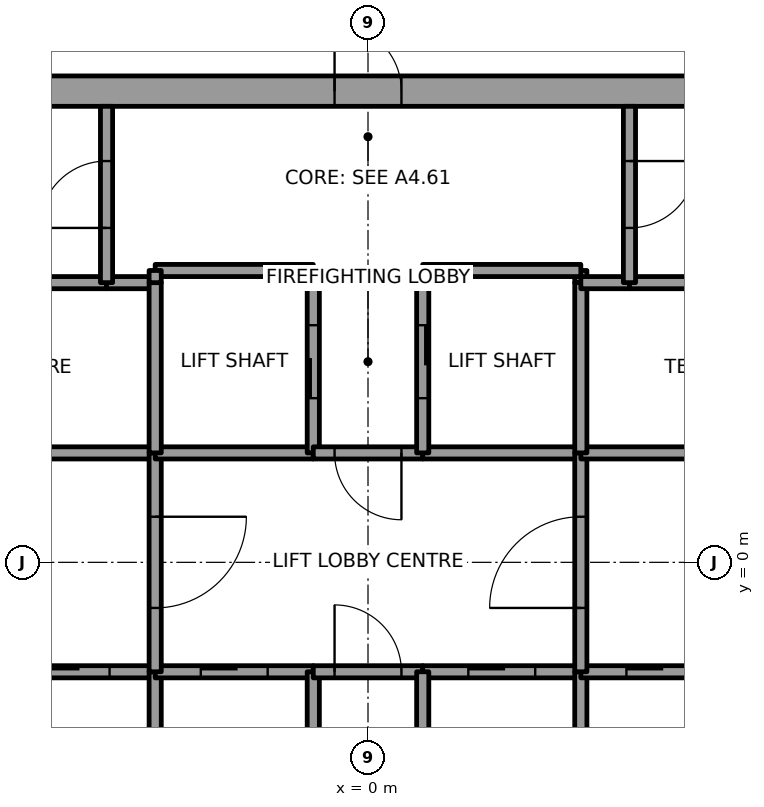
"""IFC4 building model, lengths in metres.
Left out: names, types, materials, properties, quantities, classifications, styles, units other than length and angle.
Written with IfcOpenShell. Run it as: python <this file> out.ifc"""

import sys

from ifc_helpers import new_model, si_unit, direction, frame, frame_2d, origin, place, context, subcontext, project, spatial, rectangle, extrude, element, fill, save


model = new_model("IFC4")
c1 = context("Model", 3, precision=1e-05, world=origin(), true_north=direction((0.0, 1.0)))
c2 = subcontext(c1, "Body", "Model", "MODEL_VIEW")
j1 = project(units=[si_unit("LENGTHUNIT", "METRE"), si_unit("PLANEANGLEUNIT", "RADIAN")], contexts=[c1])
p1 = place(None, origin())
s1 = spatial("IfcSite", under=j1, at=p1, CompositionType="ELEMENT")
p2 = place(p1, origin())
s2 = spatial("IfcBuilding", under=s1, at=p2, CompositionType="ELEMENT")
p3 = place(p2, frame((0.0, 0.0, 263.0)))
s3 = spatial("IfcBuildingStorey", under=s2, at=p3, CompositionType="ELEMENT", Elevation=263.0)
p4 = place(p3, frame((-11.0, 7.75, 0.0), z_axis=(0.0, 0.0, 1.0), x_axis=(1.0, 0.0, 0.0)))
e1 = element("IfcWall", 1, at=p4, inside=s3, PredefinedType="SHEAR", context=c2, shape_type="SweptSolid", body=[
    extrude(rectangle(XDim=22.0, YDim=0.5, at=frame_2d((11.0, 0.0))), origin(), (0.0, 0.0, 1.0), 4.0),
])
p5 = place(p4, frame((10.45, 0.0, 0.0)))
e2 = element("IfcOpeningElement", 2, at=p5, cuts=e1, PredefinedType="OPENING", context=c2, shape_type="SweptSolid", body=[
    extrude(rectangle(XDim=1.1, YDim=2.1, at=frame_2d((0.55, 1.05))), frame((0.0, 0.25, 0.0), z_axis=(0.0, -1.0, 0.0), x_axis=(1.0, 0.0, 0.0)), (0.0, 0.0, 1.0), 0.5),
])
p6 = place(p3, frame((-8.7, 1.8, 0.0), z_axis=(0.0, 0.0, 1.0), x_axis=(1.0, 0.0, 0.0)))
e3 = element("IfcWall", 3, at=p6, inside=s3, PredefinedType="SOLIDWALL", context=c2, shape_type="SweptSolid", body=[
    extrude(rectangle(XDim=5.2, YDim=0.2, at=frame_2d((2.6, 0.0))), origin(), (0.0, 0.0, 1.0), 3.85),
])
p7 = place(p6, frame((2.15, 0.0, 0.0)))
e4 = element("IfcOpeningElement", 4, at=p7, cuts=e3, PredefinedType="OPENING", context=c2, shape_type="SweptSolid", body=[
    extrude(rectangle(XDim=0.9, YDim=2.1, at=frame_2d((0.45, 1.05))), frame((0.0, 0.1, 0.0), z_axis=(0.0, -1.0, 0.0), x_axis=(1.0, 0.0, 0.0)), (0.0, 0.0, 1.0), 0.2),
])
p8 = place(p3, frame((-4.3, 4.6, 0.0), z_axis=(0.0, 0.0, 1.0), x_axis=(-1.0, 0.0, 0.0)))
e5 = element("IfcWall", 5, at=p8, inside=s3, PredefinedType="SOLIDWALL", context=c2, shape_type="SweptSolid", body=[
    extrude(rectangle(XDim=4.4, YDim=0.2, at=frame_2d((2.2, 0.0))), origin(), (0.0, 0.0, 1.0), 3.85),
])
p9 = place(p3, frame((-6.1, -1.8, 0.0), z_axis=(0.0, 0.0, 1.0), x_axis=(1.0, 0.0, 0.0)))
e6 = element("IfcWall", 6, at=p9, inside=s3, PredefinedType="SOLIDWALL", context=c2, shape_type="SweptSolid", body=[
    extrude(rectangle(XDim=2.6, YDim=0.2, at=frame_2d((1.3, 0.0))), origin(), (0.0, 0.0, 1.0), 3.85),
])
p10 = place(p9, frame((0.75, 0.0, 0.0)))
e7 = element("IfcOpeningElement", 7, at=p10, cuts=e6, PredefinedType="OPENING", context=c2, shape_type="SweptSolid", body=[
    extrude(rectangle(XDim=1.1, YDim=2.1, at=frame_2d((0.55, 1.05))), frame((0.0, 0.1, 0.0), z_axis=(0.0, -1.0, 0.0), x_axis=(1.0, 0.0, 0.0)), (0.0, 0.0, 1.0), 0.2),
])
p11 = place(p3, frame((-3.5, 4.6, 0.0), z_axis=(0.0, 0.0, 1.0), x_axis=(-1.0, 0.0, 0.0)))
e8 = element("IfcWall", 8, at=p11, inside=s3, PredefinedType="SOLIDWALL", context=c2, shape_type="SweptSolid", body=[
    extrude(rectangle(XDim=0.8, YDim=0.2, at=frame_2d((0.4, 0.0))), origin(), (0.0, 0.0, 1.0), 3.85),
])
p12 = place(p3, frame((-4.3, 4.6, 0.0), z_axis=(0.0, 0.0, 1.0), x_axis=(0.0, 1.0, 0.0)))
e9 = element("IfcWall", 9, at=p12, inside=s3, PredefinedType="SOLIDWALL", context=c2, shape_type="SweptSolid", body=[
    extrude(rectangle(XDim=2.9, YDim=0.2, at=frame_2d((1.45, 0.0))), origin(), (0.0, 0.0, 1.0), 3.85),
])
p13 = place(p12, frame((0.9, 0.0, 0.0)))
e10 = element("IfcOpeningElement", 10, at=p13, cuts=e9, PredefinedType="OPENING", context=c2, shape_type="SweptSolid", body=[
    extrude(rectangle(XDim=1.1, YDim=2.1, at=frame_2d((0.55, 1.05))), frame((0.0, 0.1, 0.0), z_axis=(0.0, -1.0, 0.0), x_axis=(1.0, 0.0, 0.0)), (0.0, 0.0, 1.0), 0.2),
])
p14 = place(p3, frame((-3.5, -4.6, 0.0), z_axis=(0.0, 0.0, 1.0), x_axis=(0.0, 1.0, 0.0)))
e11 = element("IfcWall", 11, at=p14, inside=s3, PredefinedType="SOLIDWALL", context=c2, shape_type="SweptSolid", body=[
    extrude(rectangle(XDim=2.8, YDim=0.2, at=frame_2d((1.4, 0.0))), origin(), (0.0, 0.0, 1.0), 3.85),
])
p15 = place(p3, frame((-3.5, -1.8, 0.0), z_axis=(0.0, 0.0, 1.0), x_axis=(1.0, 0.0, 0.0)))
e12 = element("IfcWall", 12, at=p15, inside=s3, PredefinedType="SOLIDWALL", context=c2, shape_type="SweptSolid", body=[
    extrude(rectangle(XDim=2.6, YDim=0.2, at=frame_2d((1.3, 0.0))), origin(), (0.0, 0.0, 1.0), 3.85),
])
p16 = place(p15, frame((0.75, 0.0, 0.0)))
e13 = element("IfcOpeningElement", 13, at=p16, cuts=e12, PredefinedType="OPENING", context=c2, shape_type="SweptSolid", body=[
    extrude(rectangle(XDim=1.1, YDim=2.1, at=frame_2d((0.55, 1.05))), frame((0.0, 0.1, 0.0), z_axis=(0.0, -1.0, 0.0), x_axis=(1.0, 0.0, 0.0)), (0.0, 0.0, 1.0), 0.2),
])
p17 = place(p3, frame((-3.5, 1.8, 0.0), z_axis=(0.0, 0.0, 1.0), x_axis=(0.0, -1.0, 0.0)))
e14 = element("IfcWall", 14, at=p17, inside=s3, PredefinedType="SOLIDWALL", context=c2, shape_type="SweptSolid", body=[
    extrude(rectangle(XDim=3.6, YDim=0.2, at=frame_2d((1.8, 0.0))), origin(), (0.0, 0.0, 1.0), 3.85),
])
p18 = place(p17, frame((1.05, 0.0, 0.0)))
e15 = element("IfcOpeningElement", 15, at=p18, cuts=e14, PredefinedType="OPENING", context=c2, shape_type="SweptSolid", body=[
    extrude(rectangle(XDim=1.5, YDim=2.1, at=frame_2d((0.75, 1.05))), frame((0.0, 0.1, 0.0), z_axis=(0.0, -1.0, 0.0), x_axis=(1.0, 0.0, 0.0)), (0.0, 0.0, 1.0), 0.2),
])
p19 = place(p3, frame((-0.9, 1.8, 0.0), z_axis=(0.0, 0.0, 1.0), x_axis=(-1.0, 0.0, 0.0)))
e16 = element("IfcWall", 16, at=p19, inside=s3, PredefinedType="SOLIDWALL", context=c2, shape_type="SweptSolid", body=[
    extrude(rectangle(XDim=2.6, YDim=0.2, at=frame_2d((1.3, 0.0))), origin(), (0.0, 0.0, 1.0), 3.85),
])
p20 = place(p3, frame((-3.5, 1.8, 0.0), z_axis=(0.0, 0.0, 1.0), x_axis=(0.0, 1.0, 0.0)))
e17 = element("IfcWall", 17, at=p20, inside=s3, PredefinedType="SOLIDWALL", context=c2, shape_type="SweptSolid", body=[
    extrude(rectangle(XDim=2.8, YDim=0.2, at=frame_2d((1.4, 0.0))), origin(), (0.0, 0.0, 1.0), 3.85),
])
p21 = place(p3, frame((-0.9, 1.8, 0.0), z_axis=(0.0, 0.0, 1.0), x_axis=(0.0, 1.0, 0.0)))
e18 = element("IfcWall", 18, at=p21, inside=s3, PredefinedType="SOLIDWALL", context=c2, shape_type="SweptSolid", body=[
    extrude(rectangle(XDim=3.0, YDim=0.2, at=frame_2d((1.5, 0.0))), origin(), (0.0, 0.0, 1.0), 3.85),
])
p22 = place(p21, frame((0.9, 0.0, 0.0)))
e19 = element("IfcOpeningElement", 19, at=p22, cuts=e18, PredefinedType="OPENING", context=c2, shape_type="SweptSolid", body=[
    extrude(rectangle(XDim=1.2, YDim=2.1, at=frame_2d((0.6, 1.05))), frame((0.0, 0.1, 0.0), z_axis=(0.0, -1.0, 0.0), x_axis=(1.0, 0.0, 0.0)), (0.0, 0.0, 1.0), 0.2),
])
p23 = place(p3, frame((-0.9, 4.8, 0.0), z_axis=(0.0, 0.0, 1.0), x_axis=(-1.0, 0.0, 0.0)))
e20 = element("IfcWall", 20, at=p23, inside=s3, PredefinedType="SOLIDWALL", context=c2, shape_type="SweptSolid", body=[
    extrude(rectangle(XDim=2.6, YDim=0.2, at=frame_2d((1.3, 0.0))), origin(), (0.0, 0.0, 1.0), 3.85),
])
p24 = place(p3, frame((-3.5, 4.8, 0.0), z_axis=(0.0, 0.0, 1.0), x_axis=(0.0, -1.0, 0.0)))
e21 = element("IfcWall", 21, at=p24, inside=s3, PredefinedType="SOLIDWALL", context=c2, shape_type="SweptSolid", body=[
    extrude(rectangle(XDim=0.2, YDim=0.2, at=frame_2d((0.1, 0.0))), origin(), (0.0, 0.0, 1.0), 3.85),
])
p25 = place(p3, frame((-0.9, -4.6, 0.0), z_axis=(0.0, 0.0, 1.0), x_axis=(0.0, 1.0, 0.0)))
e22 = element("IfcWall", 22, at=p25, inside=s3, PredefinedType="SOLIDWALL", context=c2, shape_type="SweptSolid", body=[
    extrude(rectangle(XDim=2.8, YDim=0.2, at=frame_2d((1.4, 0.0))), origin(), (0.0, 0.0, 1.0), 3.85),
])
p26 = place(p3, frame((-0.9, -1.8, 0.0), z_axis=(0.0, 0.0, 1.0), x_axis=(1.0, 0.0, 0.0)))
e23 = element("IfcWall", 23, at=p26, inside=s3, PredefinedType="SOLIDWALL", context=c2, shape_type="SweptSolid", body=[
    extrude(rectangle(XDim=1.8, YDim=0.2, at=frame_2d((0.9, 0.0))), origin(), (0.0, 0.0, 1.0), 3.85),
])
p27 = place(p26, frame((0.35, 0.0, 0.0)))
e24 = element("IfcOpeningElement", 24, at=p27, cuts=e23, PredefinedType="OPENING", context=c2, shape_type="SweptSolid", body=[
    extrude(rectangle(XDim=1.1, YDim=2.1, at=frame_2d((0.55, 1.05))), frame((0.0, 0.1, 0.0), z_axis=(0.0, -1.0, 0.0), x_axis=(1.0, 0.0, 0.0)), (0.0, 0.0, 1.0), 0.2),
])
p28 = place(p3, frame((0.9, 1.8, 0.0), z_axis=(0.0, 0.0, 1.0), x_axis=(-1.0, 0.0, 0.0)))
e25 = element("IfcWall", 25, at=p28, inside=s3, PredefinedType="SOLIDWALL", context=c2, shape_type="SweptSolid", body=[
    extrude(rectangle(XDim=1.8, YDim=0.2, at=frame_2d((0.9, 0.0))), origin(), (0.0, 0.0, 1.0), 3.85),
])
p29 = place(p28, frame((0.35, 0.0, 0.0)))
e26 = element("IfcOpeningElement", 26, at=p29, cuts=e25, PredefinedType="OPENING", context=c2, shape_type="SweptSolid", body=[
    extrude(rectangle(XDim=1.1, YDim=2.1, at=frame_2d((0.55, 1.05))), frame((0.0, 0.1, 0.0), z_axis=(0.0, -1.0, 0.0), x_axis=(1.0, 0.0, 0.0)), (0.0, 0.0, 1.0), 0.2),
])
p30 = place(p3, frame((0.9, -1.8, 0.0), z_axis=(0.0, 0.0, 1.0), x_axis=(1.0, 0.0, 0.0)))
e27 = element("IfcWall", 27, at=p30, inside=s3, PredefinedType="SOLIDWALL", context=c2, shape_type="SweptSolid", body=[
    extrude(rectangle(XDim=2.6, YDim=0.2, at=frame_2d((1.3, 0.0))), origin(), (0.0, 0.0, 1.0), 3.85),
])
p31 = place(p30, frame((0.75, 0.0, 0.0)))
e28 = element("IfcOpeningElement", 28, at=p31, cuts=e27, PredefinedType="OPENING", context=c2, shape_type="SweptSolid", body=[
    extrude(rectangle(XDim=1.1, YDim=2.1, at=frame_2d((0.55, 1.05))), frame((0.0, 0.1, 0.0), z_axis=(0.0, -1.0, 0.0), x_axis=(1.0, 0.0, 0.0)), (0.0, 0.0, 1.0), 0.2),
])
p32 = place(p3, frame((0.9, -1.8, 0.0), z_axis=(0.0, 0.0, 1.0), x_axis=(0.0, -1.0, 0.0)))
e29 = element("IfcWall", 29, at=p32, inside=s3, PredefinedType="SOLIDWALL", context=c2, shape_type="SweptSolid", body=[
    extrude(rectangle(XDim=2.8, YDim=0.2, at=frame_2d((1.4, 0.0))), origin(), (0.0, 0.0, 1.0), 3.85),
])
p33 = place(p3, frame((3.5, 1.8, 0.0), z_axis=(0.0, 0.0, 1.0), x_axis=(-1.0, 0.0, 0.0)))
e30 = element("IfcWall", 30, at=p33, inside=s3, PredefinedType="SOLIDWALL", context=c2, shape_type="SweptSolid", body=[
    extrude(rectangle(XDim=2.6, YDim=0.2, at=frame_2d((1.3, 0.0))), origin(), (0.0, 0.0, 1.0), 3.85),
])
p34 = place(p3, frame((3.5, 4.6, 0.0), z_axis=(0.0, 0.0, 1.0), x_axis=(0.0, 1.0, 0.0)))
e31 = element("IfcWall", 31, at=p34, inside=s3, PredefinedType="SOLIDWALL", context=c2, shape_type="SweptSolid", body=[
    extrude(rectangle(XDim=0.2, YDim=0.2, at=frame_2d((0.1, 0.0))), origin(), (0.0, 0.0, 1.0), 3.85),
])
p35 = place(p3, frame((3.5, 4.8, 0.0), z_axis=(0.0, 0.0, 1.0), x_axis=(-1.0, 0.0, 0.0)))
e32 = element("IfcWall", 32, at=p35, inside=s3, PredefinedType="SOLIDWALL", context=c2, shape_type="SweptSolid", body=[
    extrude(rectangle(XDim=2.6, YDim=0.2, at=frame_2d((1.3, 0.0))), origin(), (0.0, 0.0, 1.0), 3.85),
])
p36 = place(p3, frame((0.9, 4.8, 0.0), z_axis=(0.0, 0.0, 1.0), x_axis=(0.0, -1.0, 0.0)))
e33 = element("IfcWall", 33, at=p36, inside=s3, PredefinedType="SOLIDWALL", context=c2, shape_type="SweptSolid", body=[
    extrude(rectangle(XDim=3.0, YDim=0.2, at=frame_2d((1.5, 0.0))), origin(), (0.0, 0.0, 1.0), 3.85),
])
p37 = place(p36, frame((0.9, 0.0, 0.0)))
e34 = element("IfcOpeningElement", 34, at=p37, cuts=e33, PredefinedType="OPENING", context=c2, shape_type="SweptSolid", body=[
    extrude(rectangle(XDim=1.2, YDim=2.1, at=frame_2d((0.6, 1.05))), frame((0.0, 0.1, 0.0), z_axis=(0.0, -1.0, 0.0), x_axis=(1.0, 0.0, 0.0)), (0.0, 0.0, 1.0), 0.2),
])
p38 = place(p3, frame((3.5, -4.6, 0.0), z_axis=(0.0, 0.0, 1.0), x_axis=(0.0, 1.0, 0.0)))
e35 = element("IfcWall", 35, at=p38, inside=s3, PredefinedType="SOLIDWALL", context=c2, shape_type="SweptSolid", body=[
    extrude(rectangle(XDim=2.8, YDim=0.2, at=frame_2d((1.4, 0.0))), origin(), (0.0, 0.0, 1.0), 3.85),
])
p39 = place(p3, frame((3.5, -1.8, 0.0), z_axis=(0.0, 0.0, 1.0), x_axis=(1.0, 0.0, 0.0)))
e36 = element("IfcWall", 36, at=p39, inside=s3, PredefinedType="SOLIDWALL", context=c2, shape_type="SweptSolid", body=[
    extrude(rectangle(XDim=2.6, YDim=0.2, at=frame_2d((1.3, 0.0))), origin(), (0.0, 0.0, 1.0), 3.85),
])
p40 = place(p39, frame((0.75, 0.0, 0.0)))
e37 = element("IfcOpeningElement", 37, at=p40, cuts=e36, PredefinedType="OPENING", context=c2, shape_type="SweptSolid", body=[
    extrude(rectangle(XDim=1.1, YDim=2.1, at=frame_2d((0.55, 1.05))), frame((0.0, 0.1, 0.0), z_axis=(0.0, -1.0, 0.0), x_axis=(1.0, 0.0, 0.0)), (0.0, 0.0, 1.0), 0.2),
])
p41 = place(p3, frame((3.5, -1.8, 0.0), z_axis=(0.0, 0.0, 1.0), x_axis=(0.0, 1.0, 0.0)))
e38 = element("IfcWall", 38, at=p41, inside=s3, PredefinedType="SOLIDWALL", context=c2, shape_type="SweptSolid", body=[
    extrude(rectangle(XDim=3.6, YDim=0.2, at=frame_2d((1.8, 0.0))), origin(), (0.0, 0.0, 1.0), 3.85),
])
p42 = place(p41, frame((1.05, 0.0, 0.0)))
e39 = element("IfcOpeningElement", 39, at=p42, cuts=e38, PredefinedType="OPENING", context=c2, shape_type="SweptSolid", body=[
    extrude(rectangle(XDim=1.5, YDim=2.1, at=frame_2d((0.75, 1.05))), frame((0.0, 0.1, 0.0), z_axis=(0.0, -1.0, 0.0), x_axis=(1.0, 0.0, 0.0)), (0.0, 0.0, 1.0), 0.2),
])
p43 = place(p3, frame((3.5, 1.8, 0.0), z_axis=(0.0, 0.0, 1.0), x_axis=(1.0, 0.0, 0.0)))
e40 = element("IfcWall", 40, at=p43, inside=s3, PredefinedType="SOLIDWALL", context=c2, shape_type="SweptSolid", body=[
    extrude(rectangle(XDim=5.2, YDim=0.2, at=frame_2d((2.6, 0.0))), origin(), (0.0, 0.0, 1.0), 3.85),
])
p44 = place(p43, frame((2.15, 0.0, 0.0)))
e41 = element("IfcOpeningElement", 41, at=p44, cuts=e40, PredefinedType="OPENING", context=c2, shape_type="SweptSolid", body=[
    extrude(rectangle(XDim=0.9, YDim=2.1, at=frame_2d((0.45, 1.05))), frame((0.0, 0.1, 0.0), z_axis=(0.0, -1.0, 0.0), x_axis=(1.0, 0.0, 0.0)), (0.0, 0.0, 1.0), 0.2),
])
p45 = place(p3, frame((3.5, 4.6, 0.0), z_axis=(0.0, 0.0, 1.0), x_axis=(0.0, -1.0, 0.0)))
e42 = element("IfcWall", 42, at=p45, inside=s3, PredefinedType="SOLIDWALL", context=c2, shape_type="SweptSolid", body=[
    extrude(rectangle(XDim=2.8, YDim=0.2, at=frame_2d((1.4, 0.0))), origin(), (0.0, 0.0, 1.0), 3.85),
])
p46 = place(p3, frame((4.3, 4.6, 0.0), z_axis=(0.0, 0.0, 1.0), x_axis=(-1.0, 0.0, 0.0)))
e43 = element("IfcWall", 43, at=p46, inside=s3, PredefinedType="SOLIDWALL", context=c2, shape_type="SweptSolid", body=[
    extrude(rectangle(XDim=0.8, YDim=0.2, at=frame_2d((0.4, 0.0))), origin(), (0.0, 0.0, 1.0), 3.85),
])
p47 = place(p3, frame((8.7, 4.6, 0.0), z_axis=(0.0, 0.0, 1.0), x_axis=(-1.0, 0.0, 0.0)))
e44 = element("IfcWall", 44, at=p47, inside=s3, PredefinedType="SOLIDWALL", context=c2, shape_type="SweptSolid", body=[
    extrude(rectangle(XDim=4.4, YDim=0.2, at=frame_2d((2.2, 0.0))), origin(), (0.0, 0.0, 1.0), 3.85),
])
p48 = place(p3, frame((4.3, 7.5, 0.0), z_axis=(0.0, 0.0, 1.0), x_axis=(0.0, -1.0, 0.0)))
e45 = element("IfcWall", 45, at=p48, inside=s3, PredefinedType="SOLIDWALL", context=c2, shape_type="SweptSolid", body=[
    extrude(rectangle(XDim=2.9, YDim=0.2, at=frame_2d((1.45, 0.0))), origin(), (0.0, 0.0, 1.0), 3.85),
])
p49 = place(p48, frame((0.9, 0.0, 0.0)))
e46 = element("IfcOpeningElement", 46, at=p49, cuts=e45, PredefinedType="OPENING", context=c2, shape_type="SweptSolid", body=[
    extrude(rectangle(XDim=1.1, YDim=2.1, at=frame_2d((0.55, 1.05))), frame((0.0, 0.1, 0.0), z_axis=(0.0, -1.0, 0.0), x_axis=(1.0, 0.0, 0.0)), (0.0, 0.0, 1.0), 0.2),
])
p50 = place(p10, origin())
e47 = element("IfcDoor", 47, at=p50, inside=s3, OperationType="SLIDING_TO_RIGHT", PredefinedType="DOOR", context=c2, shape_type="SweptSolid", body=[
    extrude(rectangle(XDim=1.1, YDim=2.1, at=frame_2d((0.55, 1.05))), frame((0.0, 0.025, 0.0), z_axis=(0.0, -1.0, 0.0), x_axis=(1.0, 0.0, 0.0)), (0.0, 0.0, 1.0), 0.05),
])
fill(e7, e47)
p51 = place(p16, origin())
e48 = element("IfcDoor", 48, at=p51, inside=s3, OperationType="SLIDING_TO_LEFT", PredefinedType="DOOR", context=c2, shape_type="SweptSolid", body=[
    extrude(rectangle(XDim=1.1, YDim=2.1, at=frame_2d((0.55, 1.05))), frame((0.0, 0.025, 0.0), z_axis=(0.0, -1.0, 0.0), x_axis=(1.0, 0.0, 0.0)), (0.0, 0.0, 1.0), 0.05),
])
fill(e13, e48)
p52 = place(p31, origin())
e49 = element("IfcDoor", 49, at=p52, inside=s3, OperationType="SLIDING_TO_LEFT", PredefinedType="DOOR", context=c2, shape_type="SweptSolid", body=[
    extrude(rectangle(XDim=1.1, YDim=2.1, at=frame_2d((0.55, 1.05))), frame((0.0, 0.025, 0.0), z_axis=(0.0, -1.0, 0.0), x_axis=(1.0, 0.0, 0.0)), (0.0, 0.0, 1.0), 0.05),
])
fill(e28, e49)
p53 = place(p40, origin())
e50 = element("IfcDoor", 50, at=p53, inside=s3, OperationType="SLIDING_TO_RIGHT", PredefinedType="DOOR", context=c2, shape_type="SweptSolid", body=[
    extrude(rectangle(XDim=1.1, YDim=2.1, at=frame_2d((0.55, 1.05))), frame((0.0, 0.025, 0.0), z_axis=(0.0, -1.0, 0.0), x_axis=(1.0, 0.0, 0.0)), (0.0, 0.0, 1.0), 0.05),
])
fill(e37, e50)
p54 = place(p22, origin())
e51 = element("IfcDoor", 51, at=p54, inside=s3, OperationType="SLIDING_TO_LEFT", PredefinedType="DOOR", context=c2, shape_type="SweptSolid", body=[
    extrude(rectangle(XDim=1.2, YDim=2.1, at=frame_2d((0.6, 1.05))), frame((0.0, 0.025, 0.0), z_axis=(0.0, -1.0, 0.0), x_axis=(1.0, 0.0, 0.0)), (0.0, 0.0, 1.0), 0.05),
])
fill(e19, e51)
p55 = place(p37, origin())
e52 = element("IfcDoor", 52, at=p55, inside=s3, OperationType="SLIDING_TO_LEFT", PredefinedType="DOOR", context=c2, shape_type="SweptSolid", body=[
    extrude(rectangle(XDim=1.2, YDim=2.1, at=frame_2d((0.6, 1.05))), frame((0.0, 0.025, 0.0), z_axis=(0.0, -1.0, 0.0), x_axis=(1.0, 0.0, 0.0)), (0.0, 0.0, 1.0), 0.05),
])
fill(e34, e52)
p56 = place(p18, origin())
e53 = element("IfcDoor", 53, at=p56, inside=s3, OperationType="DOUBLE_DOOR_SINGLE_SWING", PredefinedType="DOOR", context=c2, shape_type="SweptSolid", body=[
    extrude(rectangle(XDim=1.5, YDim=2.1, at=frame_2d((0.75, 1.05))), frame((0.0, 0.025, 0.0), z_axis=(0.0, -1.0, 0.0), x_axis=(1.0, 0.0, 0.0)), (0.0, 0.0, 1.0), 0.05),
])
fill(e15, e53)
p57 = place(p42, origin())
e54 = element("IfcDoor", 54, at=p57, inside=s3, OperationType="DOUBLE_DOOR_SINGLE_SWING", PredefinedType="DOOR", context=c2, shape_type="SweptSolid", body=[
    extrude(rectangle(XDim=1.5, YDim=2.1, at=frame_2d((0.75, 1.05))), frame((0.0, 0.025, 0.0), z_axis=(0.0, -1.0, 0.0), x_axis=(1.0, 0.0, 0.0)), (0.0, 0.0, 1.0), 0.05),
])
fill(e39, e54)
p58 = place(p29, origin())
e55 = element("IfcDoor", 55, at=p58, inside=s3, OperationType="SINGLE_SWING_RIGHT", PredefinedType="DOOR", context=c2, shape_type="SweptSolid", body=[
    extrude(rectangle(XDim=1.1, YDim=2.1, at=frame_2d((0.55, 1.05))), frame((0.0, 0.025, 0.0), z_axis=(0.0, -1.0, 0.0), x_axis=(1.0, 0.0, 0.0)), (0.0, 0.0, 1.0), 0.05),
])
fill(e26, e55)
p59 = place(p27, origin())
e56 = element("IfcDoor", 56, at=p59, inside=s3, OperationType="SINGLE_SWING_RIGHT", PredefinedType="DOOR", context=c2, shape_type="SweptSolid", body=[
    extrude(rectangle(XDim=1.1, YDim=2.1, at=frame_2d((0.55, 1.05))), frame((0.0, 0.025, 0.0), z_axis=(0.0, -1.0, 0.0), x_axis=(1.0, 0.0, 0.0)), (0.0, 0.0, 1.0), 0.05),
])
fill(e24, e56)
p60 = place(p13, origin())
e57 = element("IfcDoor", 57, at=p60, inside=s3, OperationType="SINGLE_SWING_LEFT", PredefinedType="DOOR", context=c2, shape_type="SweptSolid", body=[
    extrude(rectangle(XDim=1.1, YDim=2.1, at=frame_2d((0.55, 1.05))), frame((0.0, 0.025, 0.0), z_axis=(0.0, -1.0, 0.0), x_axis=(1.0, 0.0, 0.0)), (0.0, 0.0, 1.0), 0.05),
])
fill(e10, e57)
p61 = place(p49, origin())
e58 = element("IfcDoor", 58, at=p61, inside=s3, OperationType="SINGLE_SWING_LEFT", PredefinedType="DOOR", context=c2, shape_type="SweptSolid", body=[
    extrude(rectangle(XDim=1.1, YDim=2.1, at=frame_2d((0.55, 1.05))), frame((0.0, 0.025, 0.0), z_axis=(0.0, -1.0, 0.0), x_axis=(1.0, 0.0, 0.0)), (0.0, 0.0, 1.0), 0.05),
])
fill(e46, e58)
p62 = place(p5, origin())
e59 = element("IfcDoor", 59, at=p62, inside=s3, OperationType="SINGLE_SWING_LEFT", PredefinedType="DOOR", context=c2, shape_type="SweptSolid", body=[
    extrude(rectangle(XDim=1.1, YDim=2.1, at=frame_2d((0.55, 1.05))), frame((0.0, 0.025, 0.0), z_axis=(0.0, -1.0, 0.0), x_axis=(1.0, 0.0, 0.0)), (0.0, 0.0, 1.0), 0.05),
])
fill(e2, e59)
save(model, sys.argv[1])
